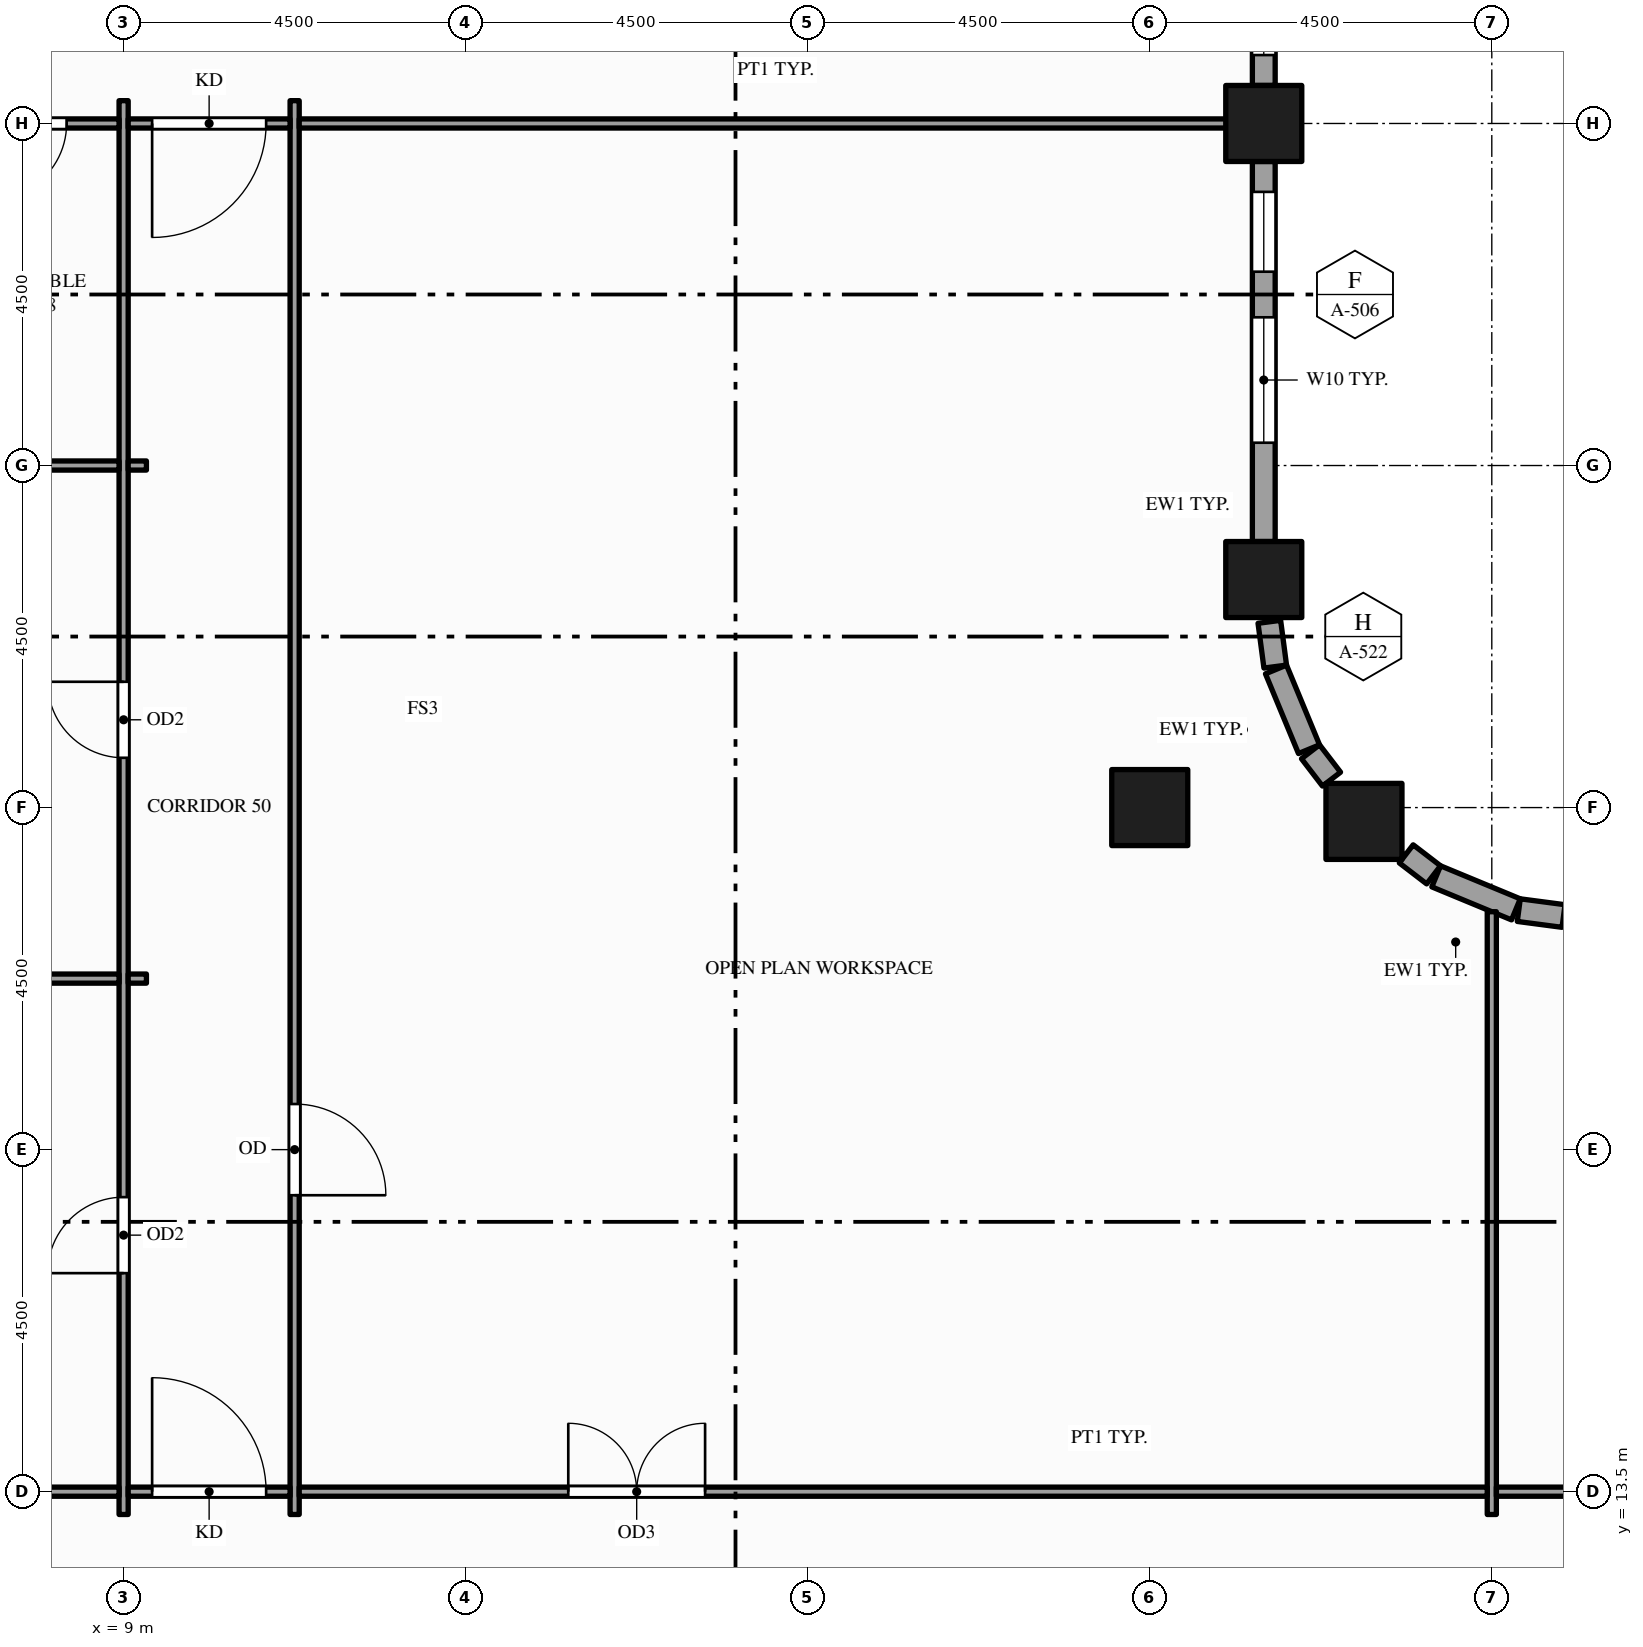
"""IFC4 building model, lengths in metres.
Left out: names, types, materials, properties, quantities, classifications, styles, units other than length and angle.
Written with IfcOpenShell. Run it as: python <this file> out.ifc"""

import sys

from ifc_helpers import new_model, si_unit, direction, frame, frame_2d, origin, origin_2d, place, context, subcontext, project, spatial, rectangle, hollow_rectangle, extrude, element, fill, save


model = new_model("IFC4")
c1 = context("Model", 3, precision=1e-05, world=origin(), true_north=direction((0.0, 1.0)))
c2 = subcontext(c1, "Body", "Model", "MODEL_VIEW")
j1 = project(units=[si_unit("LENGTHUNIT", "METRE"), si_unit("PLANEANGLEUNIT", "RADIAN")], contexts=[c1])
p1 = place(None, origin())
s1 = spatial("IfcSite", under=j1, at=p1, CompositionType="ELEMENT")
p2 = place(p1, origin())
s2 = spatial("IfcBuilding", under=s1, at=p2, CompositionType="ELEMENT")
p3 = place(p2, frame((0.0, 0.0, 127.0)))
s3 = spatial("IfcBuildingStorey", under=s2, at=p3, CompositionType="ELEMENT", Elevation=127.0)
for number, where, z_axis, x_axis in (
    (1, (22.5, 22.5, -0.15), (0.0, 0.0, 1.0), (1.0, 0.0, 0.0)),
    (2, (24.0, 25.5, -0.15), (0.0, 0.0, 1.0), (1.0, 0.0, 0.0)),
    (3, (24.0, 31.5, -0.15), (0.0, 0.0, 1.0), (1.0, 0.0, 0.0)),
    (4, (25.318, 22.318, -0.15), (0.0, 0.0, 1.0), (1.0, 0.0, 0.0)),
):
    element("IfcColumn", number, at=place(p3, frame(where, z_axis=z_axis, x_axis=x_axis)), inside=s3, PredefinedType="COLUMN", context=c2, shape_type="SweptSolid", body=[
        extrude(hollow_rectangle(XDim=1.0, YDim=1.0, WallThickness=0.05, at=origin_2d()), origin(), (0.0, 0.0, 1.0), 3.9),
    ])
p4 = place(p3, frame((27.944, 21.073, 0.0), z_axis=(0.0, 0.0, 1.0), x_axis=(-0.991420685839, 0.130709692412, 0.0)))
e5 = element("IfcWall", 5, at=p4, inside=s3, PredefinedType="STANDARD", context=c2, shape_type="SweptSolid", body=[
    extrude(rectangle(XDim=0.594, YDim=0.3, at=frame_2d((0.297, 0.0))), origin(), (0.0, 0.0, 1.0), 3.054),
])
p5 = place(p3, frame((27.317, 21.161, 0.0), z_axis=(0.0, 0.0, 1.0), x_axis=(-0.923914616768, 0.382598720491, 0.0)))
e6 = element("IfcWall", 6, at=p5, inside=s3, PredefinedType="STANDARD", context=c2, shape_type="SweptSolid", body=[
    extrude(rectangle(XDim=1.135, YDim=0.3, at=frame_2d((0.568, 0.0))), origin(), (0.0, 0.0, 1.0), 2.838),
])
p6 = place(p3, frame((26.234, 21.615, 0.0), z_axis=(0.0, 0.0, 1.0), x_axis=(-0.793563062559, 0.608488016104, 0.0)))
e7 = element("IfcWall", 7, at=p6, inside=s3, PredefinedType="STANDARD", context=c2, shape_type="SweptSolid", body=[
    extrude(rectangle(XDim=0.454, YDim=0.3, at=frame_2d((0.227, 0.0))), origin(), (0.0, 0.0, 1.0), 3.054),
])
p7 = place(p3, frame((24.891, 22.874, 0.0), z_axis=(0.0, 0.0, 1.0), x_axis=(-0.608488016104, 0.793563062559, 0.0)))
e8 = element("IfcWall", 8, at=p7, inside=s3, PredefinedType="STANDARD", context=c2, shape_type="SweptSolid", body=[
    extrude(rectangle(XDim=0.454, YDim=0.3, at=frame_2d((0.227, 0.0))), origin(), (0.0, 0.0, 1.0), 2.838),
])
p8 = place(p3, frame((24.595, 23.268, 0.0), z_axis=(0.0, 0.0, 1.0), x_axis=(-0.382598720491, 0.923914616768, 0.0)))
e9 = element("IfcWall", 9, at=p8, inside=s3, PredefinedType="STANDARD", context=c2, shape_type="SweptSolid", body=[
    extrude(rectangle(XDim=1.135, YDim=0.3, at=frame_2d((0.568, 0.0))), origin(), (0.0, 0.0, 1.0), 2.35),
])
p9 = place(p3, frame((24.151, 24.355, 0.0), z_axis=(0.0, 0.0, 1.0), x_axis=(-0.130709692412, 0.991420685839, 0.0)))
e10 = element("IfcWall", 10, at=p9, inside=s3, PredefinedType="STANDARD", context=c2, shape_type="SweptSolid", body=[
    extrude(rectangle(XDim=0.594, YDim=0.3, at=frame_2d((0.297, 0.0))), origin(), (0.0, 0.0, 1.0), 2.35),
])
p10 = place(p3, frame((24.0, 26.0, 0.0), z_axis=(0.0, 0.0, 1.0), x_axis=(0.0, 1.0, 0.0)))
e11 = element("IfcWall", 11, at=p10, inside=s3, PredefinedType="STANDARD", context=c2, shape_type="SweptSolid", body=[
    extrude(rectangle(XDim=5.0, YDim=0.3, at=frame_2d((2.5, 0.0))), origin(), (0.0, 0.0, 1.0), 3.054),
])
p11 = place(p10, frame((1.3, 0.0, 0.9)))
e12 = element("IfcOpeningElement", 12, at=p11, cuts=e11, PredefinedType="OPENING", context=c2, shape_type="SweptSolid", body=[
    extrude(rectangle(XDim=1.65, YDim=2.0, at=frame_2d((0.825, 1.0))), frame((0.0, 0.16, 0.0), z_axis=(0.0, -1.0, 0.0), x_axis=(1.0, 0.0, 0.0)), (0.0, 0.0, 1.0), 0.32),
])
p12 = place(p10, frame((3.55, 0.0, 0.9)))
e13 = element("IfcOpeningElement", 13, at=p12, cuts=e11, PredefinedType="OPENING", context=c2, shape_type="SweptSolid", body=[
    extrude(rectangle(XDim=1.05, YDim=2.0, at=frame_2d((0.525, 1.0))), frame((0.0, 0.16, 0.0), z_axis=(0.0, -1.0, 0.0), x_axis=(1.0, 0.0, 0.0)), (0.0, 0.0, 1.0), 0.32),
])
p13 = place(p3, frame((24.0, 32.0, 0.0), z_axis=(0.0, 0.0, 1.0), x_axis=(0.0, 1.0, 0.0)))
e14 = element("IfcWall", 14, at=p13, inside=s3, PredefinedType="STANDARD", context=c2, shape_type="SweptSolid", body=[
    extrude(rectangle(XDim=3.5, YDim=0.3, at=frame_2d((1.75, 0.0))), origin(), (0.0, 0.0, 1.0), 3.054),
])
p14 = place(p13, frame((0.4, 0.0, 0.9)))
e15 = element("IfcOpeningElement", 15, at=p14, cuts=e14, PredefinedType="OPENING", context=c2, shape_type="SweptSolid", body=[
    extrude(rectangle(XDim=1.05, YDim=2.0, at=frame_2d((0.525, 1.0))), frame((0.0, 0.16, 0.0), z_axis=(0.0, -1.0, 0.0), x_axis=(1.0, 0.0, 0.0)), (0.0, 0.0, 1.0), 0.32),
])
p15 = place(p13, frame((2.05, 0.0, 0.9)))
e16 = element("IfcOpeningElement", 16, at=p15, cuts=e14, PredefinedType="OPENING", context=c2, shape_type="SweptSolid", body=[
    extrude(rectangle(XDim=1.05, YDim=2.0, at=frame_2d((0.525, 1.0))), frame((0.0, 0.16, 0.0), z_axis=(0.0, -1.0, 0.0), x_axis=(1.0, 0.0, 0.0)), (0.0, 0.0, 1.0), 0.32),
])
p16 = place(p3, frame((9.0, 13.2, 0.0), z_axis=(0.0, 0.0, 1.0), x_axis=(0.0, 1.0, 0.0)))
e17 = element("IfcWall", 17, at=p16, inside=s3, PredefinedType="PARTITIONING", context=c2, shape_type="SweptSolid", body=[
    extrude(rectangle(XDim=18.6, YDim=0.12, at=frame_2d((9.3, 0.0))), origin(), (0.0, 0.0, 1.0), 2.5),
])
p17 = place(p16, frame((3.175, 0.0, 0.0)))
e18 = element("IfcOpeningElement", 18, at=p17, cuts=e17, PredefinedType="OPENING", context=c2, shape_type="SweptSolid", body=[
    extrude(rectangle(XDim=1.0, YDim=2.1, at=frame_2d((0.5, 1.05))), frame((0.0, 0.07, 0.0), z_axis=(0.0, -1.0, 0.0), x_axis=(1.0, 0.0, 0.0)), (0.0, 0.0, 1.0), 0.14),
])
p18 = place(p16, frame((9.955, 0.0, 0.0)))
e19 = element("IfcOpeningElement", 19, at=p18, cuts=e17, PredefinedType="OPENING", context=c2, shape_type="SweptSolid", body=[
    extrude(rectangle(XDim=1.0, YDim=2.1, at=frame_2d((0.5, 1.05))), frame((0.0, 0.07, 0.0), z_axis=(0.0, -1.0, 0.0), x_axis=(1.0, 0.0, 0.0)), (0.0, 0.0, 1.0), 0.14),
])
p19 = place(p3, frame((11.25, 13.2, 0.0), z_axis=(0.0, 0.0, 1.0), x_axis=(0.0, 1.0, 0.0)))
e20 = element("IfcWall", 20, at=p19, inside=s3, PredefinedType="PARTITIONING", context=c2, shape_type="SweptSolid", body=[
    extrude(rectangle(XDim=18.6, YDim=0.12, at=frame_2d((9.3, 0.0))), origin(), (0.0, 0.0, 1.0), 2.5),
])
p20 = place(p19, frame((4.2, 0.0, 0.0)))
e21 = element("IfcOpeningElement", 21, at=p20, cuts=e20, PredefinedType="OPENING", context=c2, shape_type="SweptSolid", body=[
    extrude(rectangle(XDim=1.2, YDim=2.1, at=frame_2d((0.6, 1.05))), frame((0.0, 0.07, 0.0), z_axis=(0.0, -1.0, 0.0), x_axis=(1.0, 0.0, 0.0)), (0.0, 0.0, 1.0), 0.14),
])
p21 = place(p3, frame((27.0, 13.2, 0.0), z_axis=(0.0, 0.0, 1.0), x_axis=(0.0, 1.0, 0.0)))
e22 = element("IfcWall", 22, at=p21, inside=s3, PredefinedType="PARTITIONING", context=c2, shape_type="SweptSolid", body=[
    extrude(rectangle(XDim=7.93, YDim=0.12, at=frame_2d((3.965, 0.0))), origin(), (0.0, 0.0, 1.0), 2.838),
])
p22 = place(p3, frame((0.15, 13.5, 0.0), z_axis=(0.0, 0.0, 1.0), x_axis=(1.0, 0.0, 0.0)))
e23 = element("IfcWall", 23, at=p22, inside=s3, PredefinedType="PARTITIONING", context=c2, shape_type="SweptSolid", body=[
    extrude(rectangle(XDim=8.79, YDim=0.12, at=frame_2d((4.395, 0.0))), origin(), (0.0, 0.0, 1.0), 2.838),
])
p23 = place(p3, frame((9.06, 13.5, 0.0), z_axis=(0.0, 0.0, 1.0), x_axis=(1.0, 0.0, 0.0)))
e24 = element("IfcWall", 24, at=p23, inside=s3, PredefinedType="PARTITIONING", context=c2, shape_type="SweptSolid", body=[
    extrude(rectangle(XDim=2.13, YDim=0.12, at=frame_2d((1.065, 0.0))), origin(), (0.0, 0.0, 1.0), 2.838),
])
p24 = place(p23, frame((0.315, 0.0, 0.0)))
e25 = element("IfcOpeningElement", 25, at=p24, cuts=e24, PredefinedType="OPENING", context=c2, shape_type="SweptSolid", body=[
    extrude(rectangle(XDim=1.5, YDim=2.1, at=frame_2d((0.75, 1.05))), frame((0.0, 0.07, 0.0), z_axis=(0.0, -1.0, 0.0), x_axis=(1.0, 0.0, 0.0)), (0.0, 0.0, 1.0), 0.14),
])
p25 = place(p3, frame((11.31, 13.5, 0.0), z_axis=(0.0, 0.0, 1.0), x_axis=(1.0, 0.0, 0.0)))
e26 = element("IfcWall", 26, at=p25, inside=s3, PredefinedType="PARTITIONING", context=c2, shape_type="SweptSolid", body=[
    extrude(rectangle(XDim=15.63, YDim=0.12, at=frame_2d((7.815, 0.0))), origin(), (0.0, 0.0, 1.0), 2.838),
])
p26 = place(p25, frame((3.54, 0.0, 0.0)))
e27 = element("IfcOpeningElement", 27, at=p26, cuts=e26, PredefinedType="OPENING", context=c2, shape_type="SweptSolid", body=[
    extrude(rectangle(XDim=1.8, YDim=2.1, at=frame_2d((0.9, 1.05))), frame((0.0, 0.07, 0.0), z_axis=(0.0, -1.0, 0.0), x_axis=(1.0, 0.0, 0.0)), (0.0, 0.0, 1.0), 0.14),
])
p27 = place(p3, frame((27.06, 13.5, 0.0), z_axis=(0.0, 0.0, 1.0), x_axis=(1.0, 0.0, 0.0)))
e28 = element("IfcWall", 28, at=p27, inside=s3, PredefinedType="PARTITIONING", context=c2, shape_type="SweptSolid", body=[
    extrude(rectangle(XDim=4.38, YDim=0.12, at=frame_2d((2.19, 0.0))), origin(), (0.0, 0.0, 1.0), 2.838),
])
p28 = place(p27, frame((1.74, 0.0, 0.0)))
e29 = element("IfcOpeningElement", 29, at=p28, cuts=e28, PredefinedType="OPENING", context=c2, shape_type="SweptSolid", body=[
    extrude(rectangle(XDim=0.9, YDim=2.1, at=frame_2d((0.45, 1.05))), frame((0.0, 0.07, 0.0), z_axis=(0.0, -1.0, 0.0), x_axis=(1.0, 0.0, 0.0)), (0.0, 0.0, 1.0), 0.14),
])
p29 = place(p3, frame((0.15, 20.25, 0.0), z_axis=(0.0, 0.0, 1.0), x_axis=(1.0, 0.0, 0.0)))
e30 = element("IfcWall", 30, at=p29, inside=s3, PredefinedType="PARTITIONING", context=c2, shape_type="SweptSolid", body=[
    extrude(rectangle(XDim=8.79, YDim=0.12, at=frame_2d((4.395, 0.0))), origin(), (0.0, 0.0, 1.0), 2.838),
])
p30 = place(p3, frame((9.06, 20.25, 0.0), z_axis=(0.0, 0.0, 1.0), x_axis=(1.0, 0.0, 0.0)))
e31 = element("IfcWall", 31, at=p30, inside=s3, PredefinedType="PARTITIONING", context=c2, shape_type="SweptSolid", body=[
    extrude(rectangle(XDim=0.24, YDim=0.12, at=frame_2d((0.12, 0.0))), origin(), (0.0, 0.0, 1.0), 2.838),
])
p31 = place(p3, frame((6.56, 27.0, 0.0), z_axis=(0.0, 0.0, 1.0), x_axis=(1.0, 0.0, 0.0)))
e32 = element("IfcWall", 32, at=p31, inside=s3, PredefinedType="PARTITIONING", context=c2, shape_type="SweptSolid", body=[
    extrude(rectangle(XDim=2.38, YDim=0.12, at=frame_2d((1.19, 0.0))), origin(), (0.0, 0.0, 1.0), 2.838),
])
p32 = place(p3, frame((9.06, 27.0, 0.0), z_axis=(0.0, 0.0, 1.0), x_axis=(1.0, 0.0, 0.0)))
e33 = element("IfcWall", 33, at=p32, inside=s3, PredefinedType="PARTITIONING", context=c2, shape_type="SweptSolid", body=[
    extrude(rectangle(XDim=0.24, YDim=0.12, at=frame_2d((0.12, 0.0))), origin(), (0.0, 0.0, 1.0), 2.838),
])
p33 = place(p3, frame((6.56, 31.5, 0.0), z_axis=(0.0, 0.0, 1.0), x_axis=(1.0, 0.0, 0.0)))
e34 = element("IfcWall", 34, at=p33, inside=s3, PredefinedType="PARTITIONING", context=c2, shape_type="SweptSolid", body=[
    extrude(rectangle(XDim=2.38, YDim=0.12, at=frame_2d((1.19, 0.0))), origin(), (0.0, 0.0, 1.0), 2.838),
])
p34 = place(p33, frame((0.69, 0.0, 0.0)))
e35 = element("IfcOpeningElement", 35, at=p34, cuts=e34, PredefinedType="OPENING", context=c2, shape_type="SweptSolid", body=[
    extrude(rectangle(XDim=1.0, YDim=2.1, at=frame_2d((0.5, 1.05))), frame((0.0, 0.07, 0.0), z_axis=(0.0, -1.0, 0.0), x_axis=(1.0, 0.0, 0.0)), (0.0, 0.0, 1.0), 0.14),
])
p35 = place(p3, frame((9.06, 31.5, 0.0), z_axis=(0.0, 0.0, 1.0), x_axis=(1.0, 0.0, 0.0)))
e36 = element("IfcWall", 36, at=p35, inside=s3, PredefinedType="PARTITIONING", context=c2, shape_type="SweptSolid", body=[
    extrude(rectangle(XDim=2.13, YDim=0.12, at=frame_2d((1.065, 0.0))), origin(), (0.0, 0.0, 1.0), 2.838),
])
p36 = place(p35, frame((0.315, 0.0, 0.0)))
e37 = element("IfcOpeningElement", 37, at=p36, cuts=e36, PredefinedType="OPENING", context=c2, shape_type="SweptSolid", body=[
    extrude(rectangle(XDim=1.5, YDim=2.1, at=frame_2d((0.75, 1.05))), frame((0.0, 0.07, 0.0), z_axis=(0.0, -1.0, 0.0), x_axis=(1.0, 0.0, 0.0)), (0.0, 0.0, 1.0), 0.14),
])
p37 = place(p3, frame((11.31, 31.5, 0.0), z_axis=(0.0, 0.0, 1.0), x_axis=(1.0, 0.0, 0.0)))
e38 = element("IfcWall", 38, at=p37, inside=s3, PredefinedType="PARTITIONING", context=c2, shape_type="SweptSolid", body=[
    extrude(rectangle(XDim=12.54, YDim=0.12, at=frame_2d((6.27, 0.0))), origin(), (0.0, 0.0, 1.0), 2.35),
])
p38 = place(p11, origin())
e39 = element("IfcWindow", 39, at=p38, inside=s3, PartitioningType="SINGLE_PANEL", PredefinedType="WINDOW", context=c2, shape_type="SweptSolid", body=[
    extrude(rectangle(XDim=1.65, YDim=2.0, at=frame_2d((0.825, 1.0))), frame((0.0, 0.03, 0.0), z_axis=(0.0, -1.0, 0.0), x_axis=(1.0, 0.0, 0.0)), (0.0, 0.0, 1.0), 0.06),
])
fill(e12, e39)
p39 = place(p12, origin())
e40 = element("IfcWindow", 40, at=p39, inside=s3, PartitioningType="SINGLE_PANEL", PredefinedType="WINDOW", context=c2, shape_type="SweptSolid", body=[
    extrude(rectangle(XDim=1.05, YDim=2.0, at=frame_2d((0.525, 1.0))), frame((0.0, 0.03, 0.0), z_axis=(0.0, -1.0, 0.0), x_axis=(1.0, 0.0, 0.0)), (0.0, 0.0, 1.0), 0.06),
])
fill(e13, e40)
p40 = place(p14, origin())
e41 = element("IfcWindow", 41, at=p40, inside=s3, PartitioningType="SINGLE_PANEL", PredefinedType="WINDOW", context=c2, shape_type="SweptSolid", body=[
    extrude(rectangle(XDim=1.05, YDim=2.0, at=frame_2d((0.525, 1.0))), frame((0.0, 0.03, 0.0), z_axis=(0.0, -1.0, 0.0), x_axis=(1.0, 0.0, 0.0)), (0.0, 0.0, 1.0), 0.06),
])
fill(e15, e41)
p41 = place(p26, origin())
e42 = element("IfcDoor", 42, at=p41, inside=s3, OperationType="DOUBLE_DOOR_SINGLE_SWING", PredefinedType="DOOR", context=c2, shape_type="SweptSolid", body=[
    extrude(rectangle(XDim=1.8, YDim=2.1, at=frame_2d((0.9, 1.05))), frame((0.0, 0.025, 0.0), z_axis=(0.0, -1.0, 0.0), x_axis=(1.0, 0.0, 0.0)), (0.0, 0.0, 1.0), 0.05),
])
fill(e27, e42)
p42 = place(p24, origin())
e43 = element("IfcDoor", 43, at=p42, inside=s3, OperationType="SINGLE_SWING_LEFT", PredefinedType="DOOR", context=c2, shape_type="SweptSolid", body=[
    extrude(rectangle(XDim=1.5, YDim=2.1, at=frame_2d((0.75, 1.05))), frame((0.0, 0.025, 0.0), z_axis=(0.0, -1.0, 0.0), x_axis=(1.0, 0.0, 0.0)), (0.0, 0.0, 1.0), 0.05),
])
fill(e25, e43)
p43 = place(p36, origin())
e44 = element("IfcDoor", 44, at=p43, inside=s3, OperationType="SINGLE_SWING_LEFT", PredefinedType="DOOR", context=c2, shape_type="SweptSolid", body=[
    extrude(rectangle(XDim=1.5, YDim=2.1, at=frame_2d((0.75, 1.05))), frame((0.0, 0.025, 0.0), z_axis=(0.0, -1.0, 0.0), x_axis=(1.0, 0.0, 0.0)), (0.0, 0.0, 1.0), 0.05),
])
fill(e37, e44)
p44 = place(p17, origin())
e45 = element("IfcDoor", 45, at=p44, inside=s3, OperationType="SINGLE_SWING_LEFT", PredefinedType="DOOR", context=c2, shape_type="SweptSolid", body=[
    extrude(rectangle(XDim=1.0, YDim=2.1, at=frame_2d((0.5, 1.05))), frame((0.0, 0.025, 0.0), z_axis=(0.0, -1.0, 0.0), x_axis=(1.0, 0.0, 0.0)), (0.0, 0.0, 1.0), 0.05),
])
fill(e18, e45)
p45 = place(p18, origin())
e46 = element("IfcDoor", 46, at=p45, inside=s3, OperationType="SINGLE_SWING_RIGHT", PredefinedType="DOOR", context=c2, shape_type="SweptSolid", body=[
    extrude(rectangle(XDim=1.0, YDim=2.1, at=frame_2d((0.5, 1.05))), frame((0.0, 0.025, 0.0), z_axis=(0.0, -1.0, 0.0), x_axis=(1.0, 0.0, 0.0)), (0.0, 0.0, 1.0), 0.05),
])
fill(e19, e46)
p46 = place(p34, origin())
e47 = element("IfcDoor", 47, at=p46, inside=s3, OperationType="SINGLE_SWING_LEFT", PredefinedType="DOOR", context=c2, shape_type="SweptSolid", body=[
    extrude(rectangle(XDim=1.0, YDim=2.1, at=frame_2d((0.5, 1.05))), frame((0.0, 0.025, 0.0), z_axis=(0.0, -1.0, 0.0), x_axis=(1.0, 0.0, 0.0)), (0.0, 0.0, 1.0), 0.05),
])
fill(e35, e47)
p47 = place(p20, origin())
e48 = element("IfcDoor", 48, at=p47, inside=s3, OperationType="SINGLE_SWING_LEFT", PredefinedType="DOOR", context=c2, shape_type="SweptSolid", body=[
    extrude(rectangle(XDim=1.2, YDim=2.1, at=frame_2d((0.6, 1.05))), frame((0.0, 0.025, 0.0), z_axis=(0.0, -1.0, 0.0), x_axis=(1.0, 0.0, 0.0)), (0.0, 0.0, 1.0), 0.05),
])
fill(e21, e48)
save(model, sys.argv[1])
